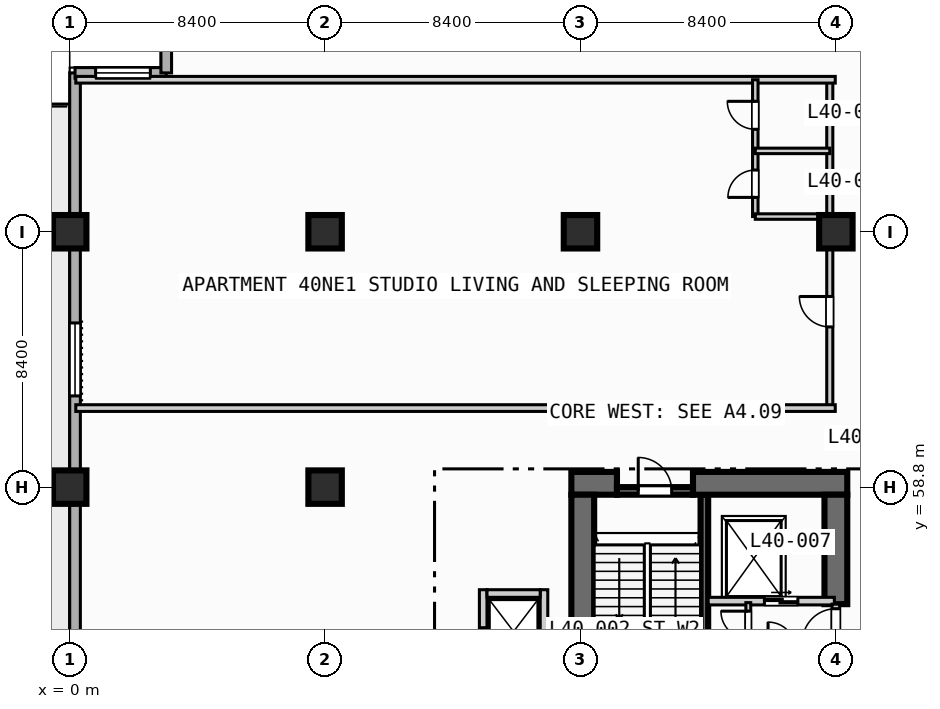
"""IFC4 building model, lengths in metres.
Left out: names, types, materials, properties, quantities, classifications, styles, units other than length and angle.
Written with IfcOpenShell. Run it as: python <this file> out.ifc"""

import sys

from ifc_helpers import new_model, si_unit, direction, frame, frame_2d, origin, origin_2d, place, context, subcontext, project, spatial, rectangle, extrude, element, fill, save


model = new_model("IFC4")
c1 = context("Model", 3, precision=1e-05, world=origin(), true_north=direction((0.0, 1.0)))
c2 = subcontext(c1, "Body", "Model", "MODEL_VIEW")
j1 = project(units=[si_unit("LENGTHUNIT", "METRE"), si_unit("PLANEANGLEUNIT", "RADIAN")], contexts=[c1])
p1 = place(None, origin())
s1 = spatial("IfcSite", under=j1, at=p1, CompositionType="ELEMENT")
p2 = place(p1, origin())
s2 = spatial("IfcBuilding", under=s1, at=p2, CompositionType="ELEMENT")
p3 = place(p2, frame((0.0, 0.0, 168.0)))
s3 = spatial("IfcBuildingStorey", under=s2, at=p3, CompositionType="ELEMENT", Elevation=168.0)
p4 = place(p3, frame((20.875, 50.5, 0.0), z_axis=(0.0, 0.0, 1.0), x_axis=(0.0, 1.0, 0.0)))
e1 = element("IfcWall", 1, at=p4, inside=s3, PredefinedType="SOLIDWALL", context=c2, shape_type="SweptSolid", body=[
    extrude(rectangle(XDim=8.05, YDim=0.25, at=frame_2d((4.025, 0.0))), origin(), (0.0, 0.0, 1.0), 3.47),
])
p5 = place(p3, frame((16.5, 58.925, 0.0), z_axis=(0.0, 0.0, 1.0), x_axis=(1.0, 0.0, 0.0)))
e2 = element("IfcWall", 2, at=p5, inside=s3, PredefinedType="SHEAR", context=c2, shape_type="SweptSolid", body=[
    extrude(rectangle(XDim=1.5, YDim=0.75, at=frame_2d((0.75, 0.0))), origin(), (0.0, 0.0, 1.0), 3.47),
])
p6 = place(p3, frame((20.5, 58.925, 0.0), z_axis=(0.0, 0.0, 1.0), x_axis=(1.0, 0.0, 0.0)))
e3 = element("IfcWall", 3, at=p6, inside=s3, PredefinedType="SHEAR", context=c2, shape_type="SweptSolid", body=[
    extrude(rectangle(XDim=5.075, YDim=0.75, at=frame_2d((2.538, 0.0))), origin(), (0.0, 0.0, 1.0), 3.47),
])
p7 = place(p3, frame((16.875, 42.2, 0.0), z_axis=(0.0, 0.0, 1.0), x_axis=(0.0, 1.0, 0.0)))
e4 = element("IfcWall", 4, at=p7, inside=s3, PredefinedType="SHEAR", context=c2, shape_type="SweptSolid", body=[
    extrude(rectangle(XDim=16.35, YDim=0.75, at=frame_2d((8.175, 0.0))), origin(), (0.0, 0.0, 1.0), 3.47),
])
p8 = place(p3, frame((25.2, 54.95, 0.0), z_axis=(0.0, 0.0, 1.0), x_axis=(0.0, 1.0, 0.0)))
e5 = element("IfcWall", 5, at=p8, inside=s3, PredefinedType="SHEAR", context=c2, shape_type="SweptSolid", body=[
    extrude(rectangle(XDim=3.6, YDim=0.75, at=frame_2d((1.8, 0.0))), origin(), (0.0, 0.0, 1.0), 3.47),
])
for number, where, z_axis, x_axis in (
    (6, (0.0, 58.8, 0.0), (0.0, 0.0, 1.0), (1.0, 0.0, 0.0)),
    (7, (0.0, 67.2, 0.0), (0.0, 0.0, 1.0), (1.0, 0.0, 0.0)),
    (8, (8.4, 58.8, 0.0), (0.0, 0.0, 1.0), (1.0, 0.0, 0.0)),
    (9, (8.4, 67.2, 0.0), (0.0, 0.0, 1.0), (1.0, 0.0, 0.0)),
    (10, (16.8, 67.2, 0.0), (0.0, 0.0, 1.0), (1.0, 0.0, 0.0)),
    (11, (25.2, 67.2, 0.0), (0.0, 0.0, 1.0), (1.0, 0.0, 0.0)),
):
    element("IfcColumn", number, at=place(p3, frame(where, z_axis=z_axis, x_axis=x_axis)), inside=s3, PredefinedType="COLUMN", context=c2, shape_type="SweptSolid", body=[
        extrude(rectangle(XDim=1.1, YDim=1.1, at=origin_2d()), origin(), (0.0, 0.0, 1.0), 3.7),
    ])
p9 = place(p3, frame((0.175, 3.175, 0.0), z_axis=(0.0, 0.0, 1.0), x_axis=(0.0, 1.0, 0.0)))
e12 = element("IfcWall", 12, at=p9, inside=s3, PredefinedType="STANDARD", context=c2, shape_type="SweptSolid", body=[
    extrude(rectangle(XDim=69.25, YDim=0.35, at=frame_2d((34.625, 0.0))), origin(), (0.0, 0.0, 1.0), 3.47),
])
p10 = place(p9, frame((42.325, 0.0, 0.0)))
e13 = element("IfcOpeningElement", 13, at=p10, cuts=e12, PredefinedType="OPENING", context=c2, shape_type="SweptSolid", body=[
    extrude(rectangle(XDim=1.4, YDim=2.2, at=frame_2d((0.7, 1.1))), frame((0.0, 0.185, 0.0), z_axis=(0.0, -1.0, 0.0), x_axis=(1.0, 0.0, 0.0)), (0.0, 0.0, 1.0), 0.37),
])
p11 = place(p9, frame((25.025, 0.0, 0.85)))
e14 = element("IfcOpeningElement", 14, at=p11, cuts=e12, PredefinedType="OPENING", context=c2, shape_type="SweptSolid", body=[
    extrude(rectangle(XDim=2.4, YDim=1.95, at=frame_2d((1.2, 0.975))), frame((0.0, 0.185, 0.0), z_axis=(0.0, -1.0, 0.0), x_axis=(1.0, 0.0, 0.0)), (0.0, 0.0, 1.0), 0.37),
])
p12 = place(p9, frame((33.725, 0.0, 0.85)))
e15 = element("IfcOpeningElement", 15, at=p12, cuts=e12, PredefinedType="OPENING", context=c2, shape_type="SweptSolid", body=[
    extrude(rectangle(XDim=1.8, YDim=1.8, at=frame_2d((0.9, 0.9))), frame((0.0, 0.185, 0.0), z_axis=(0.0, -1.0, 0.0), x_axis=(1.0, 0.0, 0.0)), (0.0, 0.0, 1.0), 0.37),
])
p13 = place(p9, frame((58.625, 0.0, 0.85)))
e16 = element("IfcOpeningElement", 16, at=p13, cuts=e12, PredefinedType="OPENING", context=c2, shape_type="SweptSolid", body=[
    extrude(rectangle(XDim=2.4, YDim=1.95, at=frame_2d((1.2, 0.975))), frame((0.0, 0.185, 0.0), z_axis=(0.0, -1.0, 0.0), x_axis=(1.0, 0.0, 0.0)), (0.0, 0.0, 1.0), 0.37),
])
p14 = place(p3, frame((0.175, 72.425, 0.0), z_axis=(0.0, 0.0, 1.0), x_axis=(1.0, 0.0, 0.0)))
e17 = element("IfcWall", 17, at=p14, inside=s3, PredefinedType="STANDARD", context=c2, shape_type="SweptSolid", body=[
    extrude(rectangle(XDim=3.0, YDim=0.35, at=frame_2d((1.5, 0.0))), origin(), (0.0, 0.0, 1.0), 3.47),
])
p15 = place(p14, frame((0.677, 0.0, 0.85)))
e18 = element("IfcOpeningElement", 18, at=p15, cuts=e17, PredefinedType="OPENING", context=c2, shape_type="SweptSolid", body=[
    extrude(rectangle(XDim=1.8, YDim=1.8, at=frame_2d((0.9, 0.9))), frame((0.0, 0.185, 0.0), z_axis=(0.0, -1.0, 0.0), x_axis=(1.0, 0.0, 0.0)), (0.0, 0.0, 1.0), 0.37),
])
p16 = place(p3, frame((3.175, 72.425, 0.0), z_axis=(0.0, 0.0, 1.0), x_axis=(0.0, 1.0, 0.0)))
e19 = element("IfcWall", 19, at=p16, inside=s3, PredefinedType="STANDARD", context=c2, shape_type="SweptSolid", body=[
    extrude(rectangle(XDim=3.0, YDim=0.35, at=frame_2d((1.5, 0.0))), origin(), (0.0, 0.0, 1.0), 3.47),
])
p17 = place(p3, frame((18.0, 58.675, 0.0), z_axis=(0.0, 0.0, 1.0), x_axis=(1.0, 0.0, 0.0)))
e20 = element("IfcWall", 20, at=p17, inside=s3, PredefinedType="SOLIDWALL", context=c2, shape_type="SweptSolid", body=[
    extrude(rectangle(XDim=2.5, YDim=0.25, at=frame_2d((1.25, 0.0))), origin(), (0.0, 0.0, 1.0), 3.47),
])
p18 = place(p17, frame((0.7, 0.0, 0.0)))
e21 = element("IfcOpeningElement", 21, at=p18, cuts=e20, PredefinedType="OPENING", context=c2, shape_type="SweptSolid", body=[
    extrude(rectangle(XDim=1.1, YDim=2.15, at=frame_2d((0.55, 1.075))), frame((0.0, 0.135, 0.0), z_axis=(0.0, -1.0, 0.0), x_axis=(1.0, 0.0, 0.0)), (0.0, 0.0, 1.0), 0.27),
])
p19 = place(p3, frame((21.0, 55.05, 0.0), z_axis=(0.0, 0.0, 1.0), x_axis=(1.0, 0.0, 0.0)))
e22 = element("IfcWall", 22, at=p19, inside=s3, PredefinedType="SOLIDWALL", context=c2, shape_type="SweptSolid", body=[
    extrude(rectangle(XDim=4.15, YDim=0.25, at=frame_2d((2.075, 0.0))), origin(), (0.0, 0.0, 1.0), 3.47),
])
p20 = place(p19, frame((1.85, 0.0, 0.0)))
e23 = element("IfcOpeningElement", 23, at=p20, cuts=e22, PredefinedType="OPENING", context=c2, shape_type="SweptSolid", body=[
    extrude(rectangle(XDim=1.1, YDim=2.15, at=frame_2d((0.55, 1.075))), frame((0.0, 0.135, 0.0), z_axis=(0.0, -1.0, 0.0), x_axis=(1.0, 0.0, 0.0)), (0.0, 0.0, 1.0), 0.27),
])
p21 = place(p3, frame((25.2, 53.55, 0.0), z_axis=(0.0, 0.0, 1.0), x_axis=(0.0, 1.0, 0.0)))
e24 = element("IfcWall", 24, at=p21, inside=s3, PredefinedType="SOLIDWALL", context=c2, shape_type="SweptSolid", body=[
    extrude(rectangle(XDim=1.4, YDim=0.25, at=frame_2d((0.7, 0.0))), origin(), (0.0, 0.0, 1.0), 3.47),
])
p22 = place(p21, frame((0.15, 0.0, 0.0)))
e25 = element("IfcOpeningElement", 25, at=p22, cuts=e24, PredefinedType="OPENING", context=c2, shape_type="SweptSolid", body=[
    extrude(rectangle(XDim=1.1, YDim=2.15, at=frame_2d((0.55, 1.075))), frame((0.0, 0.135, 0.0), z_axis=(0.0, -1.0, 0.0), x_axis=(1.0, 0.0, 0.0)), (0.0, 0.0, 1.0), 0.27),
])
p23 = place(p3, frame((22.32, 53.56, 0.0), z_axis=(0.0, 0.0, 1.0), x_axis=(0.0, 1.0, 0.0)))
e26 = element("IfcWall", 26, at=p23, inside=s3, PredefinedType="PARTITIONING", context=c2, shape_type="SweptSolid", body=[
    extrude(rectangle(XDim=1.44, YDim=0.16, at=frame_2d((0.72, 0.0))), origin(), (0.0, 0.0, 1.0), 3.47),
])
p24 = place(p23, frame((0.26, 0.0, 0.0)))
e27 = element("IfcOpeningElement", 27, at=p24, cuts=e26, PredefinedType="OPENING", context=c2, shape_type="SweptSolid", body=[
    extrude(rectangle(XDim=0.9, YDim=2.1, at=frame_2d((0.45, 1.05))), frame((0.0, 0.09, 0.0), z_axis=(0.0, -1.0, 0.0), x_axis=(1.0, 0.0, 0.0)), (0.0, 0.0, 1.0), 0.18),
])
p25 = place(p3, frame((13.6, 52.675, 0.0), z_axis=(0.0, 0.0, 1.0), x_axis=(0.0, 1.0, 0.0)))
e28 = element("IfcWall", 28, at=p25, inside=s3, PredefinedType="SOLIDWALL", context=c2, shape_type="SweptSolid", body=[
    extrude(rectangle(XDim=2.75, YDim=0.25, at=frame_2d((1.375, 0.0))), origin(), (0.0, 0.0, 1.0), 3.47),
])
p26 = place(p25, frame((0.4, 0.0, 0.0)))
e29 = element("IfcOpeningElement", 29, at=p26, cuts=e28, PredefinedType="OPENING", context=c2, shape_type="SweptSolid", body=[
    extrude(rectangle(XDim=1.1, YDim=2.15, at=frame_2d((0.55, 1.075))), frame((0.0, 0.135, 0.0), z_axis=(0.0, -1.0, 0.0), x_axis=(1.0, 0.0, 0.0)), (0.0, 0.0, 1.0), 0.27),
])
p27 = place(p3, frame((15.6, 52.675, 0.0), z_axis=(0.0, 0.0, 1.0), x_axis=(0.0, 1.0, 0.0)))
e30 = element("IfcWall", 30, at=p27, inside=s3, PredefinedType="SOLIDWALL", context=c2, shape_type="SweptSolid", body=[
    extrude(rectangle(XDim=2.75, YDim=0.25, at=frame_2d((1.375, 0.0))), origin(), (0.0, 0.0, 1.0), 3.47),
])
p28 = place(p3, frame((13.725, 55.3, 0.0), z_axis=(0.0, 0.0, 1.0), x_axis=(1.0, 0.0, 0.0)))
e31 = element("IfcWall", 31, at=p28, inside=s3, PredefinedType="SOLIDWALL", context=c2, shape_type="SweptSolid", body=[
    extrude(rectangle(XDim=1.75, YDim=0.25, at=frame_2d((0.875, 0.0))), origin(), (0.0, 0.0, 1.0), 3.47),
])
p29 = place(p3, frame((25.0, 61.4, 0.0), z_axis=(0.0, 0.0, 1.0), x_axis=(0.0, 1.0, 0.0)))
e32 = element("IfcWall", 32, at=p29, inside=s3, PredefinedType="PARTITIONING", context=c2, shape_type="SweptSolid", body=[
    extrude(rectangle(XDim=10.8, YDim=0.2, at=frame_2d((5.4, 0.0))), origin(), (0.0, 0.0, 1.0), 2.82),
])
p30 = place(p29, frame((2.67, 0.0, 0.0)))
e33 = element("IfcOpeningElement", 33, at=p30, cuts=e32, PredefinedType="OPENING", context=c2, shape_type="SweptSolid", body=[
    extrude(rectangle(XDim=1.0, YDim=2.15, at=frame_2d((0.5, 1.075))), frame((0.0, 0.11, 0.0), z_axis=(0.0, -1.0, 0.0), x_axis=(1.0, 0.0, 0.0)), (0.0, 0.0, 1.0), 0.22),
])
for number, where, z_axis, x_axis in (
    (34, (0.2, 61.4, 0.0), (0.0, 0.0, 1.0), (1.0, 0.0, 0.0)),
    (35, (0.2, 72.2, 0.0), (0.0, 0.0, 1.0), (1.0, 0.0, 0.0)),
):
    element("IfcWall", number, at=place(p3, frame(where, z_axis=z_axis, x_axis=x_axis)), inside=s3, PredefinedType="PARTITIONING", context=c2, shape_type="SweptSolid", body=[
        extrude(rectangle(XDim=24.98, YDim=0.22, at=frame_2d((12.49, 0.0))), origin(), (0.0, 0.0, 1.0), 3.47),
    ])
p31 = place(p3, frame((22.55, 67.7, 0.0), z_axis=(0.0, 0.0, 1.0), x_axis=(0.0, 1.0, 0.0)))
e36 = element("IfcWall", 36, at=p31, inside=s3, PredefinedType="PLUMBINGWALL", context=c2, shape_type="SweptSolid", body=[
    extrude(rectangle(XDim=4.5, YDim=0.18, at=frame_2d((2.25, 0.0))), origin(), (0.0, 0.0, 1.0), 3.47),
])
p32 = place(p31, frame((0.63, 0.0, 0.0)))
e37 = element("IfcOpeningElement", 37, at=p32, cuts=e36, PredefinedType="OPENING", context=c2, shape_type="SweptSolid", body=[
    extrude(rectangle(XDim=0.9, YDim=2.1, at=frame_2d((0.45, 1.05))), frame((0.0, 0.1, 0.0), z_axis=(0.0, -1.0, 0.0), x_axis=(1.0, 0.0, 0.0)), (0.0, 0.0, 1.0), 0.2),
])
p33 = place(p31, frame((2.87, 0.0, 0.0)))
e38 = element("IfcOpeningElement", 38, at=p33, cuts=e36, PredefinedType="OPENING", context=c2, shape_type="SweptSolid", body=[
    extrude(rectangle(XDim=0.92, YDim=2.1, at=frame_2d((0.46, 1.05))), frame((0.0, 0.1, 0.0), z_axis=(0.0, -1.0, 0.0), x_axis=(1.0, 0.0, 0.0)), (0.0, 0.0, 1.0), 0.2),
])
for number, where, z_axis, x_axis in (
    (39, (22.55, 67.7, 0.0), (0.0, 0.0, 1.0), (1.0, 0.0, 0.0)),
    (40, (22.55, 69.86, 0.0), (0.0, 0.0, 1.0), (1.0, 0.0, 0.0)),
):
    element("IfcWall", number, at=place(p3, frame(where, z_axis=z_axis, x_axis=x_axis)), inside=s3, PredefinedType="PLUMBINGWALL", context=c2, shape_type="SweptSolid", body=[
        extrude(rectangle(XDim=2.45, YDim=0.18, at=frame_2d((1.225, 0.0))), origin(), (0.0, 0.0, 1.0), 3.47),
    ])
p34 = place(p13, origin())
e41 = element("IfcWindow", 41, at=p34, inside=s3, PartitioningType="SINGLE_PANEL", PredefinedType="WINDOW", context=c2, shape_type="SweptSolid", body=[
    extrude(rectangle(XDim=2.4, YDim=1.95, at=frame_2d((1.2, 0.975))), frame((0.0, 0.03, 0.0), z_axis=(0.0, -1.0, 0.0), x_axis=(1.0, 0.0, 0.0)), (0.0, 0.0, 1.0), 0.06),
])
fill(e16, e41)
p35 = place(p15, origin())
e42 = element("IfcWindow", 42, at=p35, inside=s3, PartitioningType="SINGLE_PANEL", PredefinedType="WINDOW", context=c2, shape_type="SweptSolid", body=[
    extrude(rectangle(XDim=1.8, YDim=1.8, at=frame_2d((0.9, 0.9))), frame((0.0, 0.03, 0.0), z_axis=(0.0, -1.0, 0.0), x_axis=(1.0, 0.0, 0.0)), (0.0, 0.0, 1.0), 0.06),
])
fill(e18, e42)
p36 = place(p18, origin())
e43 = element("IfcDoor", 43, at=p36, inside=s3, OperationType="SINGLE_SWING_LEFT", PredefinedType="DOOR", context=c2, shape_type="SweptSolid", body=[
    extrude(rectangle(XDim=1.1, YDim=2.15, at=frame_2d((0.55, 1.075))), frame((0.0, 0.025, 0.0), z_axis=(0.0, -1.0, 0.0), x_axis=(1.0, 0.0, 0.0)), (0.0, 0.0, 1.0), 0.05),
])
fill(e21, e43)
p37 = place(p20, origin())
e44 = element("IfcDoor", 44, at=p37, inside=s3, OperationType="SLIDING_TO_LEFT", PredefinedType="DOOR", context=c2, shape_type="SweptSolid", body=[
    extrude(rectangle(XDim=1.1, YDim=2.15, at=frame_2d((0.55, 1.075))), frame((0.0, 0.025, 0.0), z_axis=(0.0, -1.0, 0.0), x_axis=(1.0, 0.0, 0.0)), (0.0, 0.0, 1.0), 0.05),
])
fill(e23, e44)
p38 = place(p22, origin())
e45 = element("IfcDoor", 45, at=p38, inside=s3, OperationType="SINGLE_SWING_LEFT", PredefinedType="DOOR", context=c2, shape_type="SweptSolid", body=[
    extrude(rectangle(XDim=1.1, YDim=2.15, at=frame_2d((0.55, 1.075))), frame((0.0, 0.025, 0.0), z_axis=(0.0, -1.0, 0.0), x_axis=(1.0, 0.0, 0.0)), (0.0, 0.0, 1.0), 0.05),
])
fill(e25, e45)
p39 = place(p24, origin())
e46 = element("IfcDoor", 46, at=p39, inside=s3, OperationType="SINGLE_SWING_RIGHT", PredefinedType="DOOR", context=c2, shape_type="SweptSolid", body=[
    extrude(rectangle(XDim=0.9, YDim=2.1, at=frame_2d((0.45, 1.05))), frame((0.0, 0.025, 0.0), z_axis=(0.0, -1.0, 0.0), x_axis=(1.0, 0.0, 0.0)), (0.0, 0.0, 1.0), 0.05),
])
fill(e27, e46)
p40 = place(p26, origin())
e47 = element("IfcDoor", 47, at=p40, inside=s3, OperationType="SLIDING_TO_LEFT", PredefinedType="DOOR", context=c2, shape_type="SweptSolid", body=[
    extrude(rectangle(XDim=1.1, YDim=2.15, at=frame_2d((0.55, 1.075))), frame((0.0, 0.025, 0.0), z_axis=(0.0, -1.0, 0.0), x_axis=(1.0, 0.0, 0.0)), (0.0, 0.0, 1.0), 0.05),
])
fill(e29, e47)
p41 = place(p30, origin())
e48 = element("IfcDoor", 48, at=p41, inside=s3, OperationType="SINGLE_SWING_RIGHT", PredefinedType="DOOR", context=c2, shape_type="SweptSolid", body=[
    extrude(rectangle(XDim=1.0, YDim=2.15, at=frame_2d((0.5, 1.075))), frame((0.0, 0.025, 0.0), z_axis=(0.0, -1.0, 0.0), x_axis=(1.0, 0.0, 0.0)), (0.0, 0.0, 1.0), 0.05),
])
fill(e33, e48)
p42 = place(p32, origin())
e49 = element("IfcDoor", 49, at=p42, inside=s3, OperationType="SINGLE_SWING_LEFT", PredefinedType="DOOR", context=c2, shape_type="SweptSolid", body=[
    extrude(rectangle(XDim=0.9, YDim=2.1, at=frame_2d((0.45, 1.05))), frame((0.0, 0.025, 0.0), z_axis=(0.0, -1.0, 0.0), x_axis=(1.0, 0.0, 0.0)), (0.0, 0.0, 1.0), 0.05),
])
fill(e37, e49)
p43 = place(p33, origin())
e50 = element("IfcDoor", 50, at=p43, inside=s3, OperationType="SINGLE_SWING_RIGHT", PredefinedType="DOOR", context=c2, shape_type="SweptSolid", body=[
    extrude(rectangle(XDim=0.92, YDim=2.1, at=frame_2d((0.46, 1.05))), frame((0.0, 0.025, 0.0), z_axis=(0.0, -1.0, 0.0), x_axis=(1.0, 0.0, 0.0)), (0.0, 0.0, 1.0), 0.05),
])
fill(e38, e50)
save(model, sys.argv[1])
